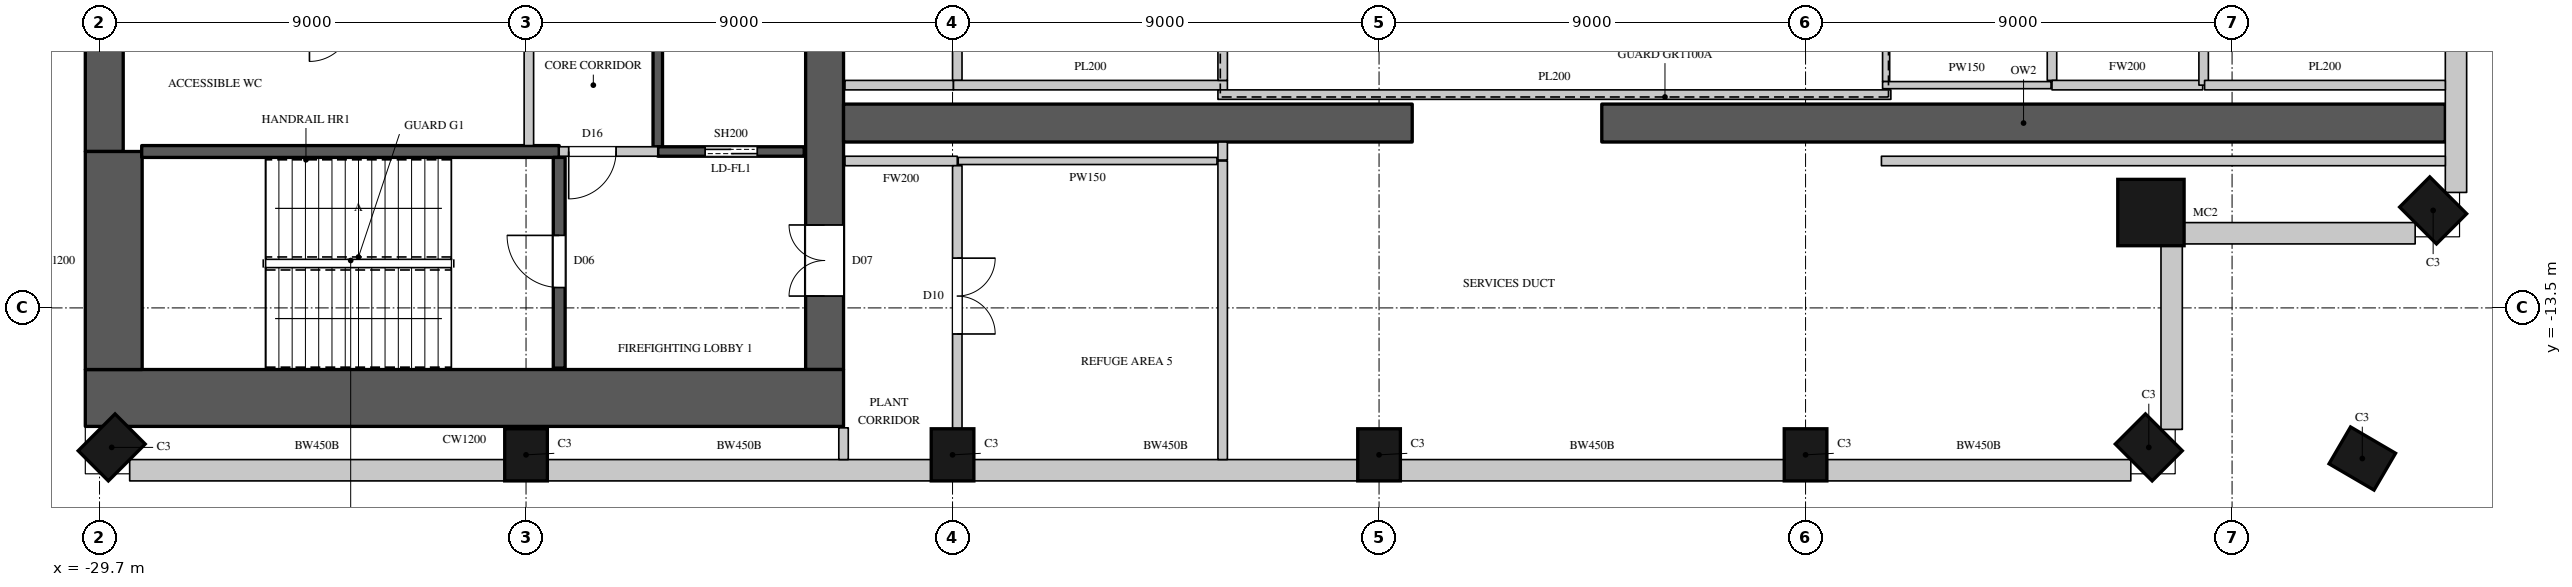
"""IFC4 building model, lengths in metres.
Left out: names, types, materials, properties, quantities, classifications, styles, units other than length and angle.
Written with IfcOpenShell. Run it as: python <this file> out.ifc"""

import sys

from ifc_helpers import new_model, si_unit, direction, frame, frame_2d, origin, origin_2d, place, context, subcontext, project, spatial, rectangle, circle, extrude, element, fill, save


model = new_model("IFC4")
c1 = context("Model", 3, precision=1e-05, world=origin(), true_north=direction((0.0, 1.0)))
c2 = subcontext(c1, "Body", "Model", "MODEL_VIEW")
j1 = project(units=[si_unit("LENGTHUNIT", "METRE"), si_unit("PLANEANGLEUNIT", "RADIAN")], contexts=[c1])
p1 = place(None, origin())
s1 = spatial("IfcSite", under=j1, at=p1, CompositionType="ELEMENT")
p2 = place(p1, origin())
s2 = spatial("IfcBuilding", under=s1, at=p2, CompositionType="ELEMENT")
p3 = place(p2, frame((0.0, 0.0, 238.4)))
s3 = spatial("IfcBuildingStorey", under=s2, at=p3, CompositionType="ELEMENT", Elevation=238.4)
for number, where, z_axis, x_axis in (
    (1, (-29.443, -16.443, 0.0), (0.0, 0.0, 1.0), (0.707, -0.707, 0.0)),
    (2, (-20.7, -16.6, 0.0), (0.0, 0.0, 1.0), (1.0, 0.0, 0.0)),
    (3, (-11.7, -16.6, 0.0), (0.0, 0.0, 1.0), (1.0, 0.0, 0.0)),
    (4, (-2.7, -16.6, 0.0), (0.0, 0.0, 1.0), (1.0, 0.0, 0.0)),
    (5, (6.3, -16.6, 0.0), (0.0, 0.0, 1.0), (1.0, 0.0, 0.0)),
    (6, (13.543, -16.443, 0.0), (0.0, 0.0, 1.0), (0.707, 0.707, 0.0)),
):
    element("IfcColumn", number, at=place(p3, frame(where, z_axis=z_axis, x_axis=x_axis)), inside=s3, PredefinedType="COLUMN", context=c2, shape_type="SweptSolid", body=[
        extrude(rectangle(XDim=0.9, YDim=1.1, at=origin_2d()), origin(), (0.0, 0.0, 1.0), 5.0),
    ])
p4 = place(p3, frame((13.588, -11.488, 0.0), z_axis=(0.0, 0.0, 1.0), x_axis=(1.0, 0.0, 0.0)))
e7 = element("IfcColumn", 7, at=p4, inside=s3, PredefinedType="COLUMN", context=c2, shape_type="SweptSolid", body=[
    extrude(circle(Radius=0.7, at=origin_2d()), origin(), (0.0, 0.0, 1.0), 5.0),
])
for number, where, z_axis, x_axis in (
    (8, (19.543, -11.443, 0.0), (0.0, 0.0, 1.0), (0.707, 0.707, 0.0)),
    (9, (18.048, -16.677, 0.0), (0.0, 0.0, 1.0), (0.504, 0.863, 0.0)),
):
    element("IfcColumn", number, at=place(p3, frame(where, z_axis=z_axis, x_axis=x_axis)), inside=s3, PredefinedType="COLUMN", context=c2, shape_type="SweptSolid", body=[
        extrude(rectangle(XDim=0.9, YDim=1.1, at=origin_2d()), origin(), (0.0, 0.0, 1.0), 5.0),
    ])
p5 = place(p3, frame((-14.0, -9.6, 0.0), z_axis=(0.0, 0.0, 1.0), x_axis=(1.0, 0.0, 0.0)))
e10 = element("IfcWall", 10, at=p5, inside=s3, PredefinedType="SOLIDWALL", context=c2, shape_type="SweptSolid", body=[
    extrude(rectangle(XDim=12.0, YDim=0.8, at=frame_2d((6.0, 0.0))), origin(), (0.0, 0.0, 1.0), 4.7),
])
p6 = place(p3, frame((2.0, -9.6, 0.0), z_axis=(0.0, 0.0, 1.0), x_axis=(1.0, 0.0, 0.0)))
e11 = element("IfcWall", 11, at=p6, inside=s3, PredefinedType="SOLIDWALL", context=c2, shape_type="SweptSolid", body=[
    extrude(rectangle(XDim=17.8, YDim=0.8, at=frame_2d((8.9, 0.0))), origin(), (0.0, 0.0, 1.0), 4.7),
])
p7 = place(p3, frame((-29.064, -16.925, 0.0), z_axis=(0.0, 0.0, 1.0), x_axis=(1.0, 0.0, 0.0)))
e12 = element("IfcWall", 12, at=p7, inside=s3, PredefinedType="SOLIDWALL", context=c2, shape_type="SweptSolid", body=[
    extrude(rectangle(XDim=7.914, YDim=0.45, at=frame_2d((3.957, 0.0))), origin(), (0.0, 0.0, 1.0), 4.7),
])
for number, where, z_axis, x_axis in (
    (13, (-20.25, -16.925, 0.0), (0.0, 0.0, 1.0), (1.0, 0.0, 0.0)),
    (14, (-11.25, -16.925, 0.0), (0.0, 0.0, 1.0), (1.0, 0.0, 0.0)),
    (15, (-2.25, -16.925, 0.0), (0.0, 0.0, 1.0), (1.0, 0.0, 0.0)),
):
    element("IfcWall", number, at=place(p3, frame(where, z_axis=z_axis, x_axis=x_axis)), inside=s3, PredefinedType="SOLIDWALL", context=c2, shape_type="SweptSolid", body=[
        extrude(rectangle(XDim=8.1, YDim=0.45, at=frame_2d((4.05, 0.0))), origin(), (0.0, 0.0, 1.0), 4.7),
    ])
p8 = place(p3, frame((6.75, -16.925, 0.0), z_axis=(0.0, 0.0, 1.0), x_axis=(1.0, 0.0, 0.0)))
e16 = element("IfcWall", 16, at=p8, inside=s3, PredefinedType="SOLIDWALL", context=c2, shape_type="SweptSolid", body=[
    extrude(rectangle(XDim=6.414, YDim=0.45, at=frame_2d((3.207, 0.0))), origin(), (0.0, 0.0, 1.0), 4.7),
])
p9 = place(p3, frame((14.025, -16.064, 0.0), z_axis=(0.0, 0.0, 1.0), x_axis=(0.0, 1.0, 0.0)))
e17 = element("IfcWall", 17, at=p9, inside=s3, PredefinedType="SOLIDWALL", context=c2, shape_type="SweptSolid", body=[
    extrude(rectangle(XDim=3.909, YDim=0.45, at=frame_2d((1.955, 0.0))), origin(), (0.0, 0.0, 1.0), 4.7),
])
p10 = place(p3, frame((14.255, -11.925, 0.0), z_axis=(0.0, 0.0, 1.0), x_axis=(1.0, 0.0, 0.0)))
e18 = element("IfcWall", 18, at=p10, inside=s3, PredefinedType="SOLIDWALL", context=c2, shape_type="SweptSolid", body=[
    extrude(rectangle(XDim=4.909, YDim=0.45, at=frame_2d((2.455, 0.0))), origin(), (0.0, 0.0, 1.0), 3.4),
])
p11 = place(p3, frame((20.025, -11.064, 0.0), z_axis=(0.0, 0.0, 1.0), x_axis=(0.0, 1.0, 0.0)))
e19 = element("IfcWall", 19, at=p11, inside=s3, PredefinedType="SOLIDWALL", context=c2, shape_type="SweptSolid", body=[
    extrude(rectangle(XDim=6.114, YDim=0.45, at=frame_2d((3.057, 0.0))), origin(), (0.0, 0.0, 1.0), 4.7),
])
p12 = place(p3, frame((-30.0, -15.4, 0.0), z_axis=(0.0, 0.0, 1.0), x_axis=(1.0, 0.0, 0.0)))
e20 = element("IfcWall", 20, at=p12, inside=s3, PredefinedType="SHEAR", context=c2, shape_type="SweptSolid", body=[
    extrude(rectangle(XDim=16.0, YDim=1.2, at=frame_2d((8.0, 0.0))), origin(), (0.0, 0.0, 1.0), 5.0),
])
p13 = place(p3, frame((-14.4, -14.8, 0.0), z_axis=(0.0, 0.0, 1.0), x_axis=(0.0, 1.0, 0.0)))
e21 = element("IfcWall", 21, at=p13, inside=s3, PredefinedType="SHEAR", context=c2, shape_type="SweptSolid", body=[
    extrude(rectangle(XDim=29.6, YDim=0.8, at=frame_2d((14.8, 0.0))), origin(), (0.0, 0.0, 1.0), 5.0),
])
p14 = place(p13, frame((1.55, 0.0, 0.0)))
e22 = element("IfcOpeningElement", 22, at=p14, cuts=e21, PredefinedType="OPENING", context=c2, shape_type="SweptSolid", body=[
    extrude(rectangle(XDim=1.5, YDim=2.4, at=frame_2d((0.75, 1.2))), frame((0.0, 0.41, 0.0), z_axis=(0.0, -1.0, 0.0), x_axis=(1.0, 0.0, 0.0)), (0.0, 0.0, 1.0), 0.82),
])
p15 = place(p13, frame((26.55, 0.0, 0.0)))
e23 = element("IfcOpeningElement", 23, at=p15, cuts=e21, PredefinedType="OPENING", context=c2, shape_type="SweptSolid", body=[
    extrude(rectangle(XDim=1.5, YDim=2.4, at=frame_2d((0.75, 1.2))), frame((0.0, 0.41, 0.0), z_axis=(0.0, -1.0, 0.0), x_axis=(1.0, 0.0, 0.0)), (0.0, 0.0, 1.0), 0.82),
])
p16 = place(p13, frame((8.45, 0.0, 0.0)))
e24 = element("IfcOpeningElement", 24, at=p16, cuts=e21, PredefinedType="OPENING", context=c2, shape_type="SweptSolid", body=[
    extrude(rectangle(XDim=1.5, YDim=2.4, at=frame_2d((0.75, 1.2))), frame((0.0, 0.41, 0.0), z_axis=(0.0, -1.0, 0.0), x_axis=(1.0, 0.0, 0.0)), (0.0, 0.0, 1.0), 0.82),
])
p17 = place(p13, frame((19.65, 0.0, 0.0)))
e25 = element("IfcOpeningElement", 25, at=p17, cuts=e21, PredefinedType="OPENING", context=c2, shape_type="SweptSolid", body=[
    extrude(rectangle(XDim=1.5, YDim=2.4, at=frame_2d((0.75, 1.2))), frame((0.0, 0.41, 0.0), z_axis=(0.0, -1.0, 0.0), x_axis=(1.0, 0.0, 0.0)), (0.0, 0.0, 1.0), 0.82),
])
p18 = place(p13, frame((14.5, 0.0, 0.0)))
e26 = element("IfcOpeningElement", 26, at=p18, cuts=e21, PredefinedType="OPENING", context=c2, shape_type="SweptSolid", body=[
    extrude(rectangle(XDim=0.6, YDim=2.0, at=frame_2d((0.3, 1.0))), frame((0.0, 0.41, 0.0), z_axis=(0.0, -1.0, 0.0), x_axis=(1.0, 0.0, 0.0)), (0.0, 0.0, 1.0), 0.82),
])
p19 = place(p3, frame((-29.6, -10.2, 0.0), z_axis=(0.0, 0.0, 1.0), x_axis=(0.0, 1.0, 0.0)))
e27 = element("IfcWall", 27, at=p19, inside=s3, PredefinedType="SHEAR", context=c2, shape_type="SweptSolid", body=[
    extrude(rectangle(XDim=20.4, YDim=0.8, at=frame_2d((10.2, 0.0))), origin(), (0.0, 0.0, 1.0), 5.0),
])
p20 = place(p3, frame((-29.4, -14.8, 0.0), z_axis=(0.0, 0.0, 1.0), x_axis=(0.0, 1.0, 0.0)))
e28 = element("IfcWall", 28, at=p20, inside=s3, PredefinedType="SHEAR", context=c2, shape_type="SweptSolid", body=[
    extrude(rectangle(XDim=4.6, YDim=1.2, at=frame_2d((2.3, 0.0))), origin(), (0.0, 0.0, 1.0), 5.0),
])
p21 = place(p3, frame((-20.64, -10.075, 0.0), z_axis=(0.0, 0.0, 1.0), x_axis=(0.0, 1.0, 0.0)))
e29 = element("IfcWall", 29, at=p21, inside=s3, PredefinedType="PARTITIONING", context=c2, shape_type="SweptSolid", body=[
    extrude(rectangle(XDim=2.575, YDim=0.2, at=frame_2d((1.288, 0.0))), origin(), (0.0, 0.0, 1.0), 4.7),
])
p22 = place(p3, frame((-20.0, -10.2, 0.0), z_axis=(0.0, 0.0, 1.0), x_axis=(1.0, 0.0, 0.0)))
e30 = element("IfcWall", 30, at=p22, inside=s3, PredefinedType="PARTITIONING", context=c2, shape_type="SweptSolid", body=[
    extrude(rectangle(XDim=2.08, YDim=0.2, at=frame_2d((1.04, 0.0))), origin(), (0.0, 0.0, 1.0), 4.7),
])
p23 = place(p22, frame((0.2, 0.0, 0.0)))
e31 = element("IfcOpeningElement", 31, at=p23, cuts=e30, PredefinedType="OPENING", context=c2, shape_type="SweptSolid", body=[
    extrude(rectangle(XDim=1.0, YDim=2.2, at=frame_2d((0.5, 1.1))), frame((0.0, 0.11, 0.0), z_axis=(0.0, -1.0, 0.0), x_axis=(1.0, 0.0, 0.0)), (0.0, 0.0, 1.0), 0.22),
])
p24 = place(p3, frame((-13.97, -10.4, 0.0), z_axis=(0.0, 0.0, 1.0), x_axis=(1.0, 0.0, 0.0)))
e32 = element("IfcWall", 32, at=p24, inside=s3, PredefinedType="PARTITIONING", context=c2, shape_type="SweptSolid", body=[
    extrude(rectangle(XDim=2.37, YDim=0.2, at=frame_2d((1.185, 0.0))), origin(), (0.0, 0.0, 1.0), 4.7),
])
p25 = place(p3, frame((-13.97, -8.8, 0.0), z_axis=(0.0, 0.0, 1.0), x_axis=(1.0, 0.0, 0.0)))
e33 = element("IfcWall", 33, at=p25, inside=s3, PredefinedType="PARTITIONING", context=c2, shape_type="SweptSolid", body=[
    extrude(rectangle(XDim=2.29, YDim=0.2, at=frame_2d((1.145, 0.0))), origin(), (0.0, 0.0, 1.0), 4.7),
])
p26 = place(p3, frame((-11.6, -16.05, 0.0), z_axis=(0.0, 0.0, 1.0), x_axis=(0.0, 1.0, 0.0)))
e34 = element("IfcWall", 34, at=p26, inside=s3, PredefinedType="PARTITIONING", context=c2, shape_type="SweptSolid", body=[
    extrude(rectangle(XDim=5.55, YDim=0.2, at=frame_2d((2.775, 0.0))), origin(), (0.0, 0.0, 1.0), 4.7),
])
p27 = place(p26, frame((2.0, 0.0, 0.0)))
e35 = element("IfcOpeningElement", 35, at=p27, cuts=e34, PredefinedType="OPENING", context=c2, shape_type="SweptSolid", body=[
    extrude(rectangle(XDim=1.6, YDim=2.4, at=frame_2d((0.8, 1.2))), frame((0.0, 0.11, 0.0), z_axis=(0.0, -1.0, 0.0), x_axis=(1.0, 0.0, 0.0)), (0.0, 0.0, 1.0), 0.22),
])
p28 = place(p3, frame((11.5, -8.7, 0.0), z_axis=(0.0, 0.0, 1.0), x_axis=(0.0, 1.0, 0.0)))
e36 = element("IfcWall", 36, at=p28, inside=s3, PredefinedType="PARTITIONING", context=c2, shape_type="SweptSolid", body=[
    extrude(rectangle(XDim=17.4, YDim=0.2, at=frame_2d((8.7, 0.0))), origin(), (0.0, 0.0, 1.0), 4.7),
])
p29 = place(p28, frame((7.9, 0.0, 0.0)))
e37 = element("IfcOpeningElement", 37, at=p29, cuts=e36, PredefinedType="OPENING", context=c2, shape_type="SweptSolid", body=[
    extrude(rectangle(XDim=1.6, YDim=2.4, at=frame_2d((0.8, 1.2))), frame((0.0, 0.11, 0.0), z_axis=(0.0, -1.0, 0.0), x_axis=(1.0, 0.0, 0.0)), (0.0, 0.0, 1.0), 0.22),
])
p30 = place(p3, frame((11.5, -8.8, 0.0), z_axis=(0.0, 0.0, 1.0), x_axis=(1.0, 0.0, 0.0)))
e38 = element("IfcWall", 38, at=p30, inside=s3, PredefinedType="PARTITIONING", context=c2, shape_type="SweptSolid", body=[
    extrude(rectangle(XDim=3.18, YDim=0.2, at=frame_2d((1.59, 0.0))), origin(), (0.0, 0.0, 1.0), 4.7),
])
p31 = place(p3, frame((-11.58, -10.4, 0.0), z_axis=(0.0, 0.0, 1.0), x_axis=(1.0, 0.0, 0.0)))
e39 = element("IfcWall", 39, at=p31, inside=s3, PredefinedType="PARTITIONING", context=c2, shape_type="SweptSolid", body=[
    extrude(rectangle(XDim=5.46, YDim=0.15, at=frame_2d((2.73, 0.0))), origin(), (0.0, 0.0, 1.0), 4.7),
])
p32 = place(p3, frame((8.0, -8.725, 0.0), z_axis=(0.0, 0.0, 1.0), x_axis=(0.0, 1.0, 0.0)))
e40 = element("IfcWall", 40, at=p32, inside=s3, PredefinedType="PARTITIONING", context=c2, shape_type="SweptSolid", body=[
    extrude(rectangle(XDim=17.45, YDim=0.15, at=frame_2d((8.725, 0.0))), origin(), (0.0, 0.0, 1.0), 4.7),
])
p33 = place(p3, frame((7.925, -8.8, 0.0), z_axis=(0.0, 0.0, 1.0), x_axis=(1.0, 0.0, 0.0)))
e41 = element("IfcWall", 41, at=p33, inside=s3, PredefinedType="PARTITIONING", context=c2, shape_type="SweptSolid", body=[
    extrude(rectangle(XDim=3.555, YDim=0.15, at=frame_2d((1.777, 0.0))), origin(), (0.0, 0.0, 1.0), 4.7),
])
p34 = place(p3, frame((-14.0, -16.7, 0.0), z_axis=(0.0, 0.0, 1.0), x_axis=(0.0, 1.0, 0.0)))
e42 = element("IfcWall", 42, at=p34, inside=s3, PredefinedType="PARTITIONING", context=c2, shape_type="SweptSolid", body=[
    extrude(rectangle(XDim=0.67, YDim=0.2, at=frame_2d((0.335, 0.0))), origin(), (0.0, 0.0, 1.0), 4.7),
])
p35 = place(p3, frame((-11.6, -8.7, 0.0), z_axis=(0.0, 0.0, 1.0), x_axis=(0.0, 1.0, 0.0)))
e43 = element("IfcWall", 43, at=p35, inside=s3, PredefinedType="PARTITIONING", context=c2, shape_type="SweptSolid", body=[
    extrude(rectangle(XDim=17.4, YDim=0.2, at=frame_2d((8.7, 0.0))), origin(), (0.0, 0.0, 1.0), 4.15),
])
p36 = place(p35, frame((3.5, 0.0, 0.0)))
e44 = element("IfcOpeningElement", 44, at=p36, cuts=e43, PredefinedType="OPENING", context=c2, shape_type="SweptSolid", body=[
    extrude(rectangle(XDim=1.8, YDim=2.4, at=frame_2d((0.9, 1.2))), frame((0.0, 0.11, 0.0), z_axis=(0.0, -1.0, 0.0), x_axis=(1.0, 0.0, 0.0)), (0.0, 0.0, 1.0), 0.22),
])
p37 = place(p35, frame((12.05, 0.0, 0.0)))
e45 = element("IfcOpeningElement", 45, at=p37, cuts=e43, PredefinedType="OPENING", context=c2, shape_type="SweptSolid", body=[
    extrude(rectangle(XDim=1.8, YDim=2.4, at=frame_2d((0.9, 1.2))), frame((0.0, 0.11, 0.0), z_axis=(0.0, -1.0, 0.0), x_axis=(1.0, 0.0, 0.0)), (0.0, 0.0, 1.0), 0.22),
])
p38 = place(p3, frame((-11.68, -8.8, 0.0), z_axis=(0.0, 0.0, 1.0), x_axis=(1.0, 0.0, 0.0)))
e46 = element("IfcWall", 46, at=p38, inside=s3, PredefinedType="PARTITIONING", context=c2, shape_type="SweptSolid", body=[
    extrude(rectangle(XDim=5.78, YDim=0.2, at=frame_2d((2.89, 0.0))), origin(), (0.0, 0.0, 1.0), 4.7),
])
p39 = place(p3, frame((-6.0, -16.7, 0.0), z_axis=(0.0, 0.0, 1.0), x_axis=(0.0, 1.0, 0.0)))
e47 = element("IfcWall", 47, at=p39, inside=s3, PredefinedType="PARTITIONING", context=c2, shape_type="SweptSolid", body=[
    extrude(rectangle(XDim=6.3, YDim=0.2, at=frame_2d((3.15, 0.0))), origin(), (0.0, 0.0, 1.0), 4.7),
])
p40 = place(p3, frame((-6.0, -10.38, 0.0), z_axis=(0.0, 0.0, 1.0), x_axis=(0.0, 1.0, 0.0)))
e48 = element("IfcWall", 48, at=p40, inside=s3, PredefinedType="PARTITIONING", context=c2, shape_type="SweptSolid", body=[
    extrude(rectangle(XDim=0.38, YDim=0.2, at=frame_2d((0.19, 0.0))), origin(), (0.0, 0.0, 1.0), 4.7),
])
p41 = place(p3, frame((-6.1, -9.0, 0.0), z_axis=(0.0, 0.0, 1.0), x_axis=(1.0, 0.0, 0.0)))
e49 = element("IfcWall", 49, at=p41, inside=s3, PredefinedType="PARTITIONING", context=c2, shape_type="SweptSolid", body=[
    extrude(rectangle(XDim=14.2, YDim=0.2, at=frame_2d((7.1, 0.0))), origin(), (0.0, 0.0, 1.0), 4.7),
])
p42 = place(p3, frame((-6.0, -8.7, 0.0), z_axis=(0.0, 0.0, 1.0), x_axis=(0.0, 1.0, 0.0)))
e50 = element("IfcWall", 50, at=p42, inside=s3, PredefinedType="PARTITIONING", context=c2, shape_type="SweptSolid", body=[
    extrude(rectangle(XDim=8.7, YDim=0.2, at=frame_2d((4.35, 0.0))), origin(), (0.0, 0.0, 1.0), 4.7),
])
p43 = place(p3, frame((7.901, -10.4, 0.0), z_axis=(0.0, 0.0, 1.0), x_axis=(1.0, 0.0, 0.0)))
e51 = element("IfcWall", 51, at=p43, inside=s3, PredefinedType="PARTITIONING", context=c2, shape_type="SweptSolid", body=[
    extrude(rectangle(XDim=11.899, YDim=0.2, at=frame_2d((5.95, 0.0))), origin(), (0.0, 0.0, 1.0), 4.7),
])
p44 = place(p3, frame((14.7, -8.8, 0.0), z_axis=(0.0, 0.0, 1.0), x_axis=(0.0, 1.0, 0.0)))
e52 = element("IfcWall", 52, at=p44, inside=s3, PredefinedType="PARTITIONING", context=c2, shape_type="SweptSolid", body=[
    extrude(rectangle(XDim=4.05, YDim=0.2, at=frame_2d((2.025, 0.0))), origin(), (0.0, 0.0, 1.0), 4.7),
])
p45 = place(p44, frame((1.1, 0.0, 0.0)))
e53 = element("IfcOpeningElement", 53, at=p45, cuts=e52, PredefinedType="OPENING", context=c2, shape_type="SweptSolid", body=[
    extrude(rectangle(XDim=1.8, YDim=2.4, at=frame_2d((0.9, 1.2))), frame((0.0, 0.11, 0.0), z_axis=(0.0, -1.0, 0.0), x_axis=(1.0, 0.0, 0.0)), (0.0, 0.0, 1.0), 0.22),
])
p46 = place(p3, frame((14.72, -8.8, 0.0), z_axis=(0.0, 0.0, 1.0), x_axis=(1.0, 0.0, 0.0)))
e54 = element("IfcWall", 54, at=p46, inside=s3, PredefinedType="PARTITIONING", context=c2, shape_type="SweptSolid", body=[
    extrude(rectangle(XDim=5.08, YDim=0.2, at=frame_2d((2.54, 0.0))), origin(), (0.0, 0.0, 1.0), 4.7),
])
p47 = place(p3, frame((-17.92, -10.1, 0.0), z_axis=(0.0, 0.0, 1.0), x_axis=(0.0, 1.0, 0.0)))
e55 = element("IfcWall", 55, at=p47, inside=s3, PredefinedType="SHEAR", context=c2, shape_type="SweptSolid", body=[
    extrude(rectangle(XDim=2.6, YDim=0.2, at=frame_2d((1.3, 0.0))), origin(), (0.0, 0.0, 1.0), 4.7),
])
p48 = place(p3, frame((-17.92, -10.2, 0.0), z_axis=(0.0, 0.0, 1.0), x_axis=(1.0, 0.0, 0.0)))
e56 = element("IfcWall", 56, at=p48, inside=s3, PredefinedType="SHEAR", context=c2, shape_type="SweptSolid", body=[
    extrude(rectangle(XDim=3.09, YDim=0.2, at=frame_2d((1.545, 0.0))), origin(), (0.0, 0.0, 1.0), 4.7),
])
p49 = place(p48, frame((1.0, 0.0, 0.0)))
e57 = element("IfcOpeningElement", 57, at=p49, cuts=e56, PredefinedType="OPENING", context=c2, shape_type="SweptSolid", body=[
    extrude(rectangle(XDim=1.1, YDim=2.2, at=frame_2d((0.55, 1.1))), frame((0.0, 0.11, 0.0), z_axis=(0.0, -1.0, 0.0), x_axis=(1.0, 0.0, 0.0)), (0.0, 0.0, 1.0), 0.22),
])
p50 = place(p3, frame((-28.81, -10.2, 0.0), z_axis=(0.0, 0.0, 1.0), x_axis=(1.0, 0.0, 0.0)))
e58 = element("IfcWall", 58, at=p50, inside=s3, PredefinedType="SHEAR", context=c2, shape_type="SweptSolid", body=[
    extrude(rectangle(XDim=8.81, YDim=0.25, at=frame_2d((4.405, 0.0))), origin(), (0.0, 0.0, 1.0), 4.7),
])
p51 = place(p3, frame((-20.0, -14.77, 0.0), z_axis=(0.0, 0.0, 1.0), x_axis=(0.0, 1.0, 0.0)))
e59 = element("IfcWall", 59, at=p51, inside=s3, PredefinedType="SHEAR", context=c2, shape_type="SweptSolid", body=[
    extrude(rectangle(XDim=4.445, YDim=0.25, at=frame_2d((2.223, 0.0))), origin(), (0.0, 0.0, 1.0), 4.7),
])
p52 = place(p51, frame((1.7, 0.0, 0.0)))
e60 = element("IfcOpeningElement", 60, at=p52, cuts=e59, PredefinedType="OPENING", context=c2, shape_type="SweptSolid", body=[
    extrude(rectangle(XDim=1.1, YDim=2.2, at=frame_2d((0.55, 1.1))), frame((0.0, 0.135, 0.0), z_axis=(0.0, -1.0, 0.0), x_axis=(1.0, 0.0, 0.0)), (0.0, 0.0, 1.0), 0.27),
])
p53 = place(p52, origin())
e61 = element("IfcDoor", 61, at=p53, inside=s3, OperationType="SINGLE_SWING_RIGHT", PredefinedType="DOOR", context=c2, shape_type="SweptSolid", body=[
    extrude(rectangle(XDim=1.1, YDim=2.2, at=frame_2d((0.55, 1.1))), frame((0.0, 0.025, 0.0), z_axis=(0.0, -1.0, 0.0), x_axis=(1.0, 0.0, 0.0)), (0.0, 0.0, 1.0), 0.05),
])
fill(e60, e61)
p54 = place(p23, origin())
e62 = element("IfcDoor", 62, at=p54, inside=s3, OperationType="SINGLE_SWING_RIGHT", PredefinedType="DOOR", context=c2, shape_type="SweptSolid", body=[
    extrude(rectangle(XDim=1.0, YDim=2.2, at=frame_2d((0.5, 1.1))), frame((0.0, 0.025, 0.0), z_axis=(0.0, -1.0, 0.0), x_axis=(1.0, 0.0, 0.0)), (0.0, 0.0, 1.0), 0.05),
])
fill(e31, e62)
p55 = place(p49, origin())
e63 = element("IfcDoor", 63, at=p55, inside=s3, OperationType="DOUBLE_DOOR_SLIDING", PredefinedType="DOOR", context=c2, shape_type="SweptSolid", body=[
    extrude(rectangle(XDim=1.1, YDim=2.2, at=frame_2d((0.55, 1.1))), frame((0.0, 0.025, 0.0), z_axis=(0.0, -1.0, 0.0), x_axis=(1.0, 0.0, 0.0)), (0.0, 0.0, 1.0), 0.05),
])
fill(e57, e63)
p56 = place(p27, origin())
e64 = element("IfcDoor", 64, at=p56, inside=s3, OperationType="DOUBLE_DOOR_SINGLE_SWING", PredefinedType="DOOR", context=c2, shape_type="SweptSolid", body=[
    extrude(rectangle(XDim=1.6, YDim=2.4, at=frame_2d((0.8, 1.2))), frame((0.0, 0.025, 0.0), z_axis=(0.0, -1.0, 0.0), x_axis=(1.0, 0.0, 0.0)), (0.0, 0.0, 1.0), 0.05),
])
fill(e35, e64)
p57 = place(p14, origin())
e65 = element("IfcDoor", 65, at=p57, inside=s3, OperationType="DOUBLE_DOOR_SINGLE_SWING", PredefinedType="DOOR", context=c2, shape_type="SweptSolid", body=[
    extrude(rectangle(XDim=1.5, YDim=2.4, at=frame_2d((0.75, 1.2))), frame((0.0, 0.395, 0.0), z_axis=(0.0, -1.0, 0.0), x_axis=(1.0, 0.0, 0.0)), (0.0, 0.0, 1.0), 0.05),
])
fill(e22, e65)
save(model, sys.argv[1])
